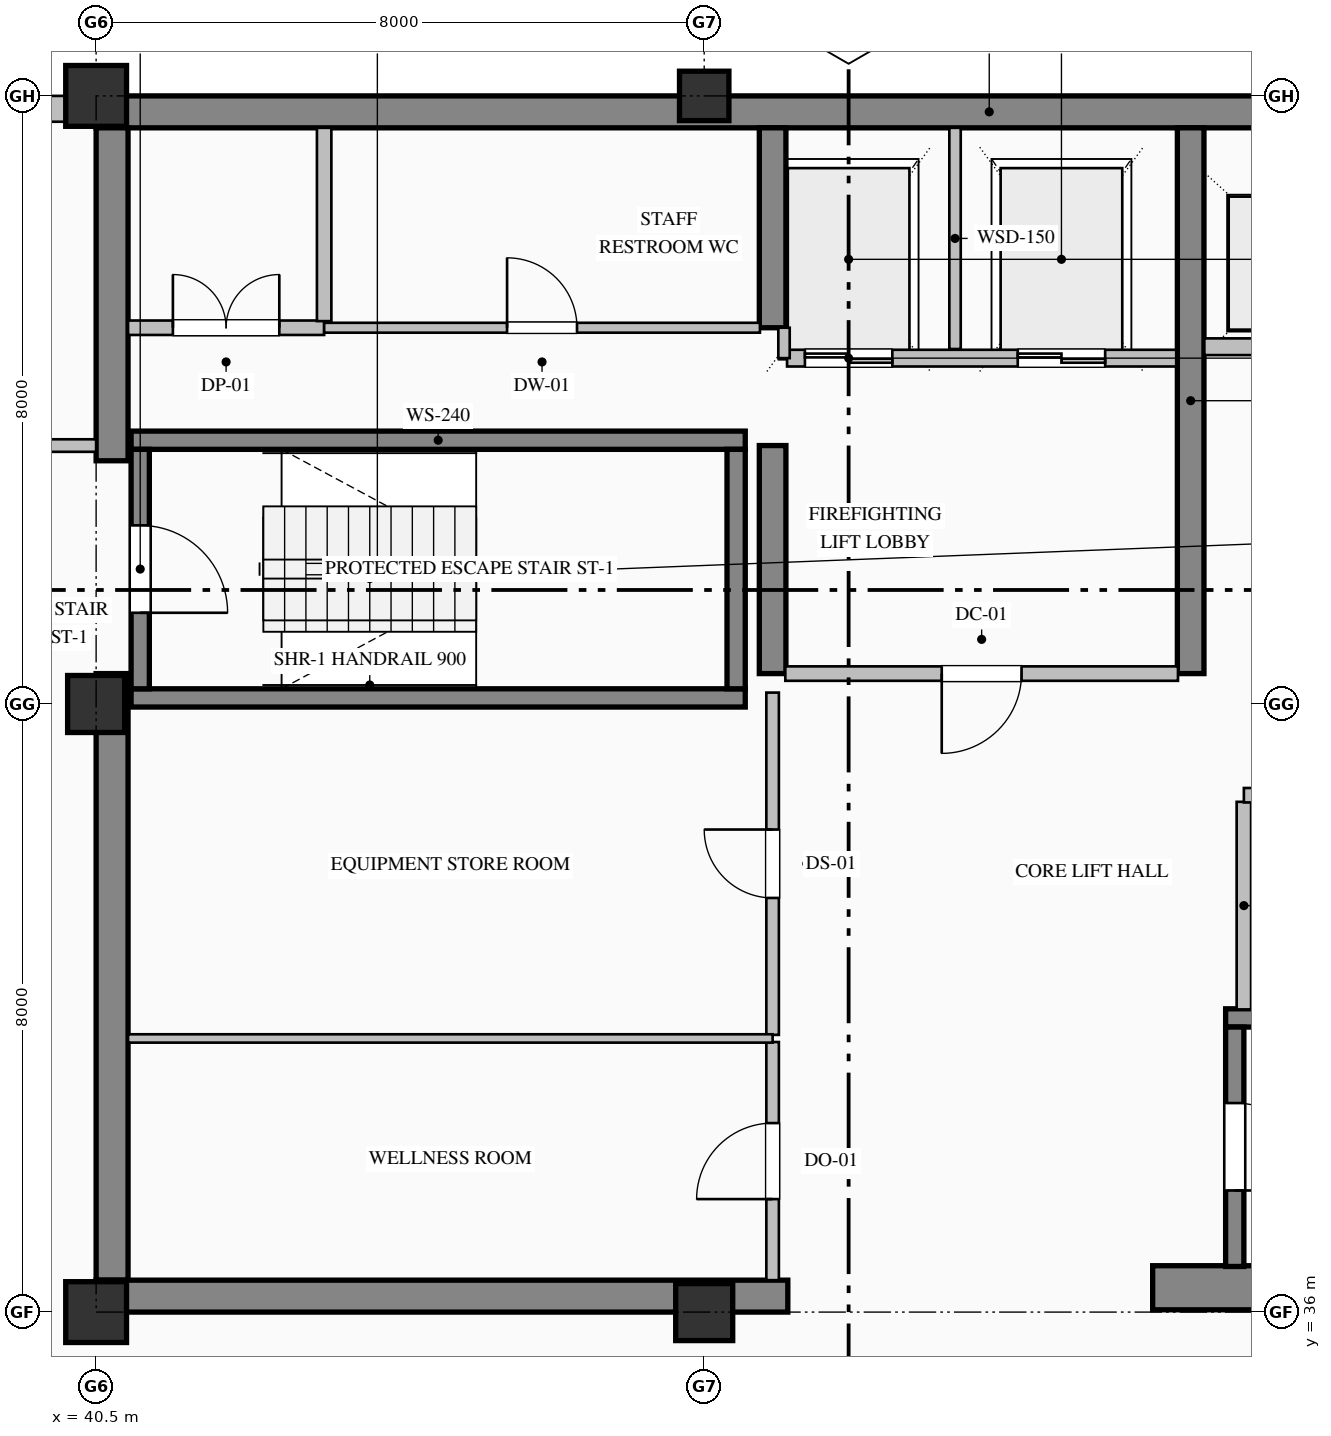
"""IFC4 building model, lengths in metres.
Left out: names, types, materials, properties, quantities, classifications, styles, units other than length and angle.
Written with IfcOpenShell. Run it as: python <this file> out.ifc"""

import sys

from ifc_helpers import new_model, si_unit, direction, frame, frame_2d, origin, origin_2d, place, context, subcontext, project, spatial, rectangle, hollow_rectangle, extrude, element, fill, save


model = new_model("IFC4")
c1 = context("Model", 3, precision=1e-05, world=origin(), true_north=direction((0.0, 1.0)))
c2 = subcontext(c1, "Body", "Model", "MODEL_VIEW")
j1 = project(units=[si_unit("LENGTHUNIT", "METRE"), si_unit("PLANEANGLEUNIT", "RADIAN")], contexts=[c1])
p1 = place(None, origin())
s1 = spatial("IfcSite", under=j1, at=p1, CompositionType="ELEMENT")
p2 = place(p1, origin())
s2 = spatial("IfcBuilding", under=s1, at=p2, CompositionType="ELEMENT")
p3 = place(p2, frame((0.0, 0.0, 343.2)))
s3 = spatial("IfcBuildingStorey", under=s2, at=p3, CompositionType="ELEMENT", Elevation=343.2)
p4 = place(p3, frame((40.5, 51.79, 0.0), z_axis=(0.0, 0.0, 1.0), x_axis=(1.0, 0.0, 0.0)))
e1 = element("IfcWall", 1, at=p4, inside=s3, PredefinedType="SHEAR", context=c2, shape_type="SweptSolid", body=[
    extrude(rectangle(XDim=23.5, YDim=0.42, at=frame_2d((11.75, 0.0))), origin(), (0.0, 0.0, 1.0), 3.785),
])
p5 = place(p3, frame((40.71, 36.42, 0.0), z_axis=(0.0, 0.0, 1.0), x_axis=(0.0, 1.0, 0.0)))
e2 = element("IfcWall", 2, at=p5, inside=s3, PredefinedType="SHEAR", context=c2, shape_type="SweptSolid", body=[
    extrude(rectangle(XDim=7.98, YDim=0.42, at=frame_2d((3.99, 0.0))), origin(), (0.0, 0.0, 1.0), 3.785),
])
p6 = place(p3, frame((40.71, 47.2, 0.0), z_axis=(0.0, 0.0, 1.0), x_axis=(0.0, 1.0, 0.0)))
e3 = element("IfcWall", 3, at=p6, inside=s3, PredefinedType="SHEAR", context=c2, shape_type="SweptSolid", body=[
    extrude(rectangle(XDim=4.38, YDim=0.42, at=frame_2d((2.19, 0.0))), origin(), (0.0, 0.0, 1.0), 3.785),
])
p7 = place(p3, frame((40.5, 36.21, 0.0), z_axis=(0.0, 0.0, 1.0), x_axis=(1.0, 0.0, 0.0)))
e4 = element("IfcWall", 4, at=p7, inside=s3, PredefinedType="SHEAR", context=c2, shape_type="SweptSolid", body=[
    extrude(rectangle(XDim=9.1, YDim=0.42, at=frame_2d((4.55, 0.0))), origin(), (0.0, 0.0, 1.0), 3.785),
])
p8 = place(p3, frame((54.4, 36.32, 0.0), z_axis=(0.0, 0.0, 1.0), x_axis=(1.0, 0.0, 0.0)))
e5 = element("IfcWall", 5, at=p8, inside=s3, PredefinedType="SHEAR", context=c2, shape_type="SweptSolid", body=[
    extrude(rectangle(XDim=9.6, YDim=0.58, at=frame_2d((4.8, 0.0))), origin(), (0.0, 0.0, 1.0), 4.0),
])
p9 = place(p3, frame((49.4, 44.4, 0.0), z_axis=(0.0, 0.0, 1.0), x_axis=(0.0, 1.0, 0.0)))
e6 = element("IfcWall", 6, at=p9, inside=s3, PredefinedType="SHEAR", context=c2, shape_type="SweptSolid", body=[
    extrude(rectangle(XDim=3.0, YDim=0.35, at=frame_2d((1.5, 0.0))), origin(), (0.0, 0.0, 1.0), 3.785),
])
p10 = place(p3, frame((49.4, 48.95, 0.0), z_axis=(0.0, 0.0, 1.0), x_axis=(0.0, 1.0, 0.0)))
e7 = element("IfcWall", 7, at=p10, inside=s3, PredefinedType="SHEAR", context=c2, shape_type="SweptSolid", body=[
    extrude(rectangle(XDim=2.63, YDim=0.35, at=frame_2d((1.315, 0.0))), origin(), (0.0, 0.0, 1.0), 3.785),
])
p11 = place(p3, frame((54.9, 44.4, 0.0), z_axis=(0.0, 0.0, 1.0), x_axis=(0.0, 1.0, 0.0)))
e8 = element("IfcWall", 8, at=p11, inside=s3, PredefinedType="SHEAR", context=c2, shape_type="SweptSolid", body=[
    extrude(rectangle(XDim=7.18, YDim=0.35, at=frame_2d((3.59, 0.0))), origin(), (0.0, 0.0, 1.0), 3.785),
])
p12 = place(p3, frame((40.5, 36.0, 0.0), z_axis=(0.0, 0.0, 1.0), x_axis=(1.0, 0.0, 0.0)))
e9 = element("IfcColumn", 9, at=p12, inside=s3, PredefinedType="COLUMN", context=c2, shape_type="SweptSolid", body=[
    extrude(hollow_rectangle(XDim=0.8, YDim=0.8, WallThickness=0.032, at=origin_2d()), origin(), (0.0, 0.0, 1.0), 4.0),
])
p13 = place(p3, frame((40.5, 44.0, 0.0), z_axis=(0.0, 0.0, 1.0), x_axis=(1.0, 0.0, 0.0)))
e10 = element("IfcColumn", 10, at=p13, inside=s3, PredefinedType="COLUMN", context=c2, shape_type="SweptSolid", body=[
    extrude(rectangle(XDim=0.75, YDim=0.75, at=origin_2d()), origin(), (0.0, 0.0, 1.0), 4.0),
])
p14 = place(p3, frame((40.5, 52.0, 0.0), z_axis=(0.0, 0.0, 1.0), x_axis=(1.0, 0.0, 0.0)))
e11 = element("IfcColumn", 11, at=p14, inside=s3, PredefinedType="COLUMN", context=c2, shape_type="SweptSolid", body=[
    extrude(hollow_rectangle(XDim=0.8, YDim=0.8, WallThickness=0.032, at=origin_2d()), origin(), (0.0, 0.0, 1.0), 4.0),
])
p15 = place(p3, frame((48.5, 36.0, 0.0), z_axis=(0.0, 0.0, 1.0), x_axis=(1.0, 0.0, 0.0)))
e12 = element("IfcColumn", 12, at=p15, inside=s3, PredefinedType="COLUMN", context=c2, shape_type="SweptSolid", body=[
    extrude(rectangle(XDim=0.75, YDim=0.75, at=origin_2d()), origin(), (0.0, 0.0, 1.0), 4.0),
])
p16 = place(p3, frame((48.5, 52.0, 0.0), z_axis=(0.0, 0.0, 1.0), x_axis=(1.0, 0.0, 0.0)))
e13 = element("IfcColumn", 13, at=p16, inside=s3, PredefinedType="COLUMN", context=c2, shape_type="SweptSolid", body=[
    extrude(hollow_rectangle(XDim=0.65, YDim=0.65, WallThickness=0.028, at=origin_2d()), origin(), (0.0, 0.0, 1.0), 4.0),
])
p17 = place(p3, frame((20.5, 51.83, 0.0), z_axis=(0.0, 0.0, 1.0), x_axis=(1.0, 0.0, 0.0)))
e14 = element("IfcWall", 14, at=p17, inside=s3, PredefinedType="SOLIDWALL", context=c2, shape_type="SweptSolid", body=[
    extrude(rectangle(XDim=20.02, YDim=0.34, at=frame_2d((10.01, 0.0))), origin(), (0.0, 0.0, 1.0), 3.335),
])
for number, where, z_axis, x_axis in (
    (15, (40.96, 47.47, 0.0), (0.0, 0.0, 1.0), (1.0, 0.0, 0.0)),
    (16, (49.04, 44.08, 0.0), (0.0, 0.0, 1.0), (-1.0, 0.0, 0.0)),
):
    element("IfcWall", number, at=place(p3, frame(where, z_axis=z_axis, x_axis=x_axis)), inside=s3, PredefinedType="SOLIDWALL", context=c2, shape_type="SweptSolid", body=[
        extrude(rectangle(XDim=8.08, YDim=0.24, at=frame_2d((4.04, 0.0))), origin(), (0.0, 0.0, 1.0), 4.0),
    ])
p18 = place(p3, frame((41.08, 47.35, 0.0), z_axis=(0.0, 0.0, 1.0), x_axis=(0.0, -1.0, 0.0)))
e17 = element("IfcWall", 17, at=p18, inside=s3, PredefinedType="SOLIDWALL", context=c2, shape_type="SweptSolid", body=[
    extrude(rectangle(XDim=3.15, YDim=0.24, at=frame_2d((1.575, 0.0))), origin(), (0.0, 0.0, 1.0), 4.0),
])
p19 = place(p18, frame((1.0, 0.0, 0.0)))
e18 = element("IfcOpeningElement", 18, at=p19, cuts=e17, PredefinedType="OPENING", context=c2, shape_type="SweptSolid", body=[
    extrude(rectangle(XDim=1.15, YDim=2.2, at=frame_2d((0.575, 1.1))), frame((0.0, 0.13, 0.0), z_axis=(0.0, -1.0, 0.0), x_axis=(1.0, 0.0, 0.0)), (0.0, 0.0, 1.0), 0.26),
])
p20 = place(p3, frame((48.92, 44.2, 0.0), z_axis=(0.0, 0.0, 1.0), x_axis=(0.0, 1.0, 0.0)))
e19 = element("IfcWall", 19, at=p20, inside=s3, PredefinedType="SOLIDWALL", context=c2, shape_type="SweptSolid", body=[
    extrude(rectangle(XDim=3.15, YDim=0.24, at=frame_2d((1.575, 0.0))), origin(), (0.0, 0.0, 1.0), 4.0),
])
p21 = place(p3, frame((55.36, 39.87, 0.0), z_axis=(0.0, 0.0, 1.0), x_axis=(1.0, 0.0, 0.0)))
e20 = element("IfcWall", 20, at=p21, inside=s3, PredefinedType="SOLIDWALL", context=c2, shape_type="SweptSolid", body=[
    extrude(rectangle(XDim=8.08, YDim=0.24, at=frame_2d((4.04, 0.0))), origin(), (0.0, 0.0, 1.0), 4.0),
])
p22 = place(p3, frame((55.48, 39.75, 0.0), z_axis=(0.0, 0.0, 1.0), x_axis=(0.0, -1.0, 0.0)))
e21 = element("IfcWall", 21, at=p22, inside=s3, PredefinedType="SOLIDWALL", context=c2, shape_type="SweptSolid", body=[
    extrude(rectangle(XDim=3.15, YDim=0.24, at=frame_2d((1.575, 0.0))), origin(), (0.0, 0.0, 1.0), 4.0),
])
p23 = place(p22, frame((1.0, 0.0, 0.0)))
e22 = element("IfcOpeningElement", 22, at=p23, cuts=e21, PredefinedType="OPENING", context=c2, shape_type="SweptSolid", body=[
    extrude(rectangle(XDim=1.15, YDim=2.2, at=frame_2d((0.575, 1.1))), frame((0.0, 0.13, 0.0), z_axis=(0.0, -1.0, 0.0), x_axis=(1.0, 0.0, 0.0)), (0.0, 0.0, 1.0), 0.26),
])
p24 = place(p3, frame((54.71, 48.55, 0.0), z_axis=(0.0, 0.0, 1.0), x_axis=(-1.0, 0.0, 0.0)))
e23 = element("IfcWall", 23, at=p24, inside=s3, PredefinedType="PARTITIONING", context=c2, shape_type="SweptSolid", body=[
    extrude(rectangle(XDim=5.12, YDim=0.22, at=frame_2d((2.56, 0.0))), origin(), (0.0, 0.0, 1.0), 3.785),
])
p25 = place(p24, frame((3.735, 0.0, 0.0)))
e24 = element("IfcOpeningElement", 24, at=p25, cuts=e23, PredefinedType="OPENING", context=c2, shape_type="SweptSolid", body=[
    extrude(rectangle(XDim=1.15, YDim=2.2, at=frame_2d((0.575, 1.1))), frame((0.0, 0.12, 0.0), z_axis=(0.0, -1.0, 0.0), x_axis=(1.0, 0.0, 0.0)), (0.0, 0.0, 1.0), 0.24),
])
p26 = place(p24, frame((0.935, 0.0, 0.0)))
e25 = element("IfcOpeningElement", 25, at=p26, cuts=e23, PredefinedType="OPENING", context=c2, shape_type="SweptSolid", body=[
    extrude(rectangle(XDim=1.15, YDim=2.2, at=frame_2d((0.575, 1.1))), frame((0.0, 0.12, 0.0), z_axis=(0.0, -1.0, 0.0), x_axis=(1.0, 0.0, 0.0)), (0.0, 0.0, 1.0), 0.24),
])
p27 = place(p3, frame((51.8, 48.67, 0.0), z_axis=(0.0, 0.0, 1.0), x_axis=(0.0, 1.0, 0.0)))
e26 = element("IfcWall", 26, at=p27, inside=s3, PredefinedType="PARTITIONING", context=c2, shape_type="SweptSolid", body=[
    extrude(rectangle(XDim=2.91, YDim=0.15, at=frame_2d((1.455, 0.0))), origin(), (0.0, 0.0, 1.0), 3.785),
])
p28 = place(p3, frame((49.55, 48.55, 0.0), z_axis=(0.0, 0.0, 1.0), x_axis=(0.0, 1.0, 0.0)))
e27 = element("IfcWall", 27, at=p28, inside=s3, PredefinedType="PARTITIONING", context=c2, shape_type="SweptSolid", body=[
    extrude(rectangle(XDim=0.4, YDim=0.15, at=frame_2d((0.2, 0.0))), origin(), (0.0, 0.0, 1.0), 3.785),
])
p29 = place(p3, frame((63.32, 48.7, 0.0), z_axis=(0.0, 0.0, 1.0), x_axis=(-1.0, 0.0, 0.0)))
e28 = element("IfcWall", 28, at=p29, inside=s3, PredefinedType="PARTITIONING", context=c2, shape_type="SweptSolid", body=[
    extrude(rectangle(XDim=8.24, YDim=0.22, at=frame_2d((4.12, 0.0))), origin(), (0.0, 0.0, 1.0), 3.785),
])
p30 = place(p29, frame((6.37, 0.0, 0.0)))
e29 = element("IfcOpeningElement", 29, at=p30, cuts=e28, PredefinedType="OPENING", context=c2, shape_type="SweptSolid", body=[
    extrude(rectangle(XDim=1.1, YDim=2.2, at=frame_2d((0.55, 1.1))), frame((0.0, 0.12, 0.0), z_axis=(0.0, -1.0, 0.0), x_axis=(1.0, 0.0, 0.0)), (0.0, 0.0, 1.0), 0.24),
])
p31 = place(p29, frame((3.57, 0.0, 0.0)))
e30 = element("IfcOpeningElement", 30, at=p31, cuts=e28, PredefinedType="OPENING", context=c2, shape_type="SweptSolid", body=[
    extrude(rectangle(XDim=1.1, YDim=2.2, at=frame_2d((0.55, 1.1))), frame((0.0, 0.12, 0.0), z_axis=(0.0, -1.0, 0.0), x_axis=(1.0, 0.0, 0.0)), (0.0, 0.0, 1.0), 0.24),
])
p32 = place(p29, frame((0.77, 0.0, 0.0)))
e31 = element("IfcOpeningElement", 31, at=p32, cuts=e28, PredefinedType="OPENING", context=c2, shape_type="SweptSolid", body=[
    extrude(rectangle(XDim=1.1, YDim=2.2, at=frame_2d((0.55, 1.1))), frame((0.0, 0.12, 0.0), z_axis=(0.0, -1.0, 0.0), x_axis=(1.0, 0.0, 0.0)), (0.0, 0.0, 1.0), 0.24),
])
p33 = place(p3, frame((37.8, 47.4, 0.0), z_axis=(0.0, 0.0, 1.0), x_axis=(1.0, 0.0, 0.0)))
e32 = element("IfcWall", 32, at=p33, inside=s3, PredefinedType="PARTITIONING", context=c2, shape_type="SweptSolid", body=[
    extrude(rectangle(XDim=2.7, YDim=0.165, at=frame_2d((1.35, 0.0))), origin(), (0.0, 0.0, 1.0), 3.785),
])
p34 = place(p33, frame((0.825, 0.0, 0.0)))
e33 = element("IfcOpeningElement", 33, at=p34, cuts=e32, PredefinedType="OPENING", context=c2, shape_type="SweptSolid", body=[
    extrude(rectangle(XDim=1.05, YDim=2.15, at=frame_2d((0.525, 1.075))), frame((0.0, 0.093, 0.0), z_axis=(0.0, -1.0, 0.0), x_axis=(1.0, 0.0, 0.0)), (0.0, 0.0, 1.0), 0.185),
])
p35 = place(p3, frame((40.92, 48.95, 0.0), z_axis=(0.0, 0.0, 1.0), x_axis=(1.0, 0.0, 0.0)))
e34 = element("IfcWall", 34, at=p35, inside=s3, PredefinedType="PARTITIONING", context=c2, shape_type="SweptSolid", body=[
    extrude(rectangle(XDim=2.58, YDim=0.19, at=frame_2d((1.29, 0.0))), origin(), (0.0, 0.0, 1.0), 3.785),
])
p36 = place(p35, frame((0.59, 0.0, 0.0)))
e35 = element("IfcOpeningElement", 35, at=p36, cuts=e34, PredefinedType="OPENING", context=c2, shape_type="SweptSolid", body=[
    extrude(rectangle(XDim=1.4, YDim=2.25, at=frame_2d((0.7, 1.125))), frame((0.0, 0.105, 0.0), z_axis=(0.0, -1.0, 0.0), x_axis=(1.0, 0.0, 0.0)), (0.0, 0.0, 1.0), 0.21),
])
p37 = place(p3, frame((43.5, 48.95, 0.0), z_axis=(0.0, 0.0, 1.0), x_axis=(1.0, 0.0, 0.0)))
e36 = element("IfcWall", 36, at=p37, inside=s3, PredefinedType="PARTITIONING", context=c2, shape_type="SweptSolid", body=[
    extrude(rectangle(XDim=5.733, YDim=0.13, at=frame_2d((2.866, 0.0))), origin(), (0.0, 0.0, 1.0), 3.785),
])
p38 = place(p37, frame((2.406, 0.0, 0.0)))
e37 = element("IfcOpeningElement", 37, at=p38, cuts=e36, PredefinedType="OPENING", context=c2, shape_type="SweptSolid", body=[
    extrude(rectangle(XDim=0.92, YDim=2.15, at=frame_2d((0.46, 1.075))), frame((0.0, 0.075, 0.0), z_axis=(0.0, -1.0, 0.0), x_axis=(1.0, 0.0, 0.0)), (0.0, 0.0, 1.0), 0.15),
])
p39 = place(p3, frame((54.733, 44.4, 0.0), z_axis=(0.0, 0.0, 1.0), x_axis=(-1.0, 0.0, 0.0)))
e38 = element("IfcWall", 38, at=p39, inside=s3, PredefinedType="PARTITIONING", context=c2, shape_type="SweptSolid", body=[
    extrude(rectangle(XDim=5.166, YDim=0.19, at=frame_2d((2.583, 0.0))), origin(), (0.0, 0.0, 1.0), 3.785),
])
p40 = place(p39, frame((2.058, 0.0, 0.0)))
e39 = element("IfcOpeningElement", 39, at=p40, cuts=e38, PredefinedType="OPENING", context=c2, shape_type="SweptSolid", body=[
    extrude(rectangle(XDim=1.05, YDim=2.15, at=frame_2d((0.525, 1.075))), frame((0.0, 0.105, 0.0), z_axis=(0.0, -1.0, 0.0), x_axis=(1.0, 0.0, 0.0)), (0.0, 0.0, 1.0), 0.21),
])
p41 = place(p3, frame((49.4, 36.42, 0.0), z_axis=(0.0, 0.0, 1.0), x_axis=(0.0, 1.0, 0.0)))
e40 = element("IfcWall", 40, at=p41, inside=s3, PredefinedType="PARTITIONING", context=c2, shape_type="SweptSolid", body=[
    extrude(rectangle(XDim=3.133, YDim=0.165, at=frame_2d((1.566, 0.0))), origin(), (0.0, 0.0, 1.0), 3.027),
])
p42 = place(p41, frame((1.066, 0.0, 0.0)))
e41 = element("IfcOpeningElement", 41, at=p42, cuts=e40, PredefinedType="OPENING", context=c2, shape_type="SweptSolid", body=[
    extrude(rectangle(XDim=1.0, YDim=2.15, at=frame_2d((0.5, 1.075))), frame((0.0, 0.093, 0.0), z_axis=(0.0, -1.0, 0.0), x_axis=(1.0, 0.0, 0.0)), (0.0, 0.0, 1.0), 0.185),
])
p43 = place(p3, frame((49.4, 39.647, 0.0), z_axis=(0.0, 0.0, 1.0), x_axis=(0.0, 1.0, 0.0)))
e42 = element("IfcWall", 42, at=p43, inside=s3, PredefinedType="PARTITIONING", context=c2, shape_type="SweptSolid", body=[
    extrude(rectangle(XDim=4.503, YDim=0.165, at=frame_2d((2.251, 0.0))), origin(), (0.0, 0.0, 1.0), 3.027),
])
p44 = place(p43, frame((1.802, 0.0, 0.0)))
e43 = element("IfcOpeningElement", 43, at=p44, cuts=e42, PredefinedType="OPENING", context=c2, shape_type="SweptSolid", body=[
    extrude(rectangle(XDim=0.9, YDim=2.15, at=frame_2d((0.45, 1.075))), frame((0.0, 0.093, 0.0), z_axis=(0.0, -1.0, 0.0), x_axis=(1.0, 0.0, 0.0)), (0.0, 0.0, 1.0), 0.185),
])
p45 = place(p3, frame((55.6, 42.713, 0.0), z_axis=(0.0, 0.0, 1.0), x_axis=(0.0, -1.0, 0.0)))
e44 = element("IfcWall", 44, at=p45, inside=s3, PredefinedType="PARTITIONING", context=c2, shape_type="SweptSolid", body=[
    extrude(rectangle(XDim=2.731, YDim=0.19, at=frame_2d((1.365, 0.0))), origin(), (0.0, 0.0, 1.0), 3.785),
])
p46 = place(p3, frame((40.92, 39.6, 0.0), z_axis=(0.0, 0.0, 1.0), x_axis=(1.0, 0.0, 0.0)))
e45 = element("IfcWall", 45, at=p46, inside=s3, PredefinedType="MOVABLE", context=c2, shape_type="SweptSolid", body=[
    extrude(rectangle(XDim=8.48, YDim=0.11, at=frame_2d((4.24, 0.0))), origin(), (0.0, 0.0, 1.0), 3.785),
])
p47 = place(p3, frame((60.6, 42.8, 0.0), z_axis=(0.0, 0.0, 1.0), x_axis=(-1.0, 0.0, 0.0)))
e46 = element("IfcWall", 46, at=p47, inside=s3, PredefinedType="PARTITIONING", context=c2, shape_type="SweptSolid", body=[
    extrude(rectangle(XDim=5.0, YDim=0.19, at=frame_2d((2.5, 0.0))), origin(), (0.0, 0.0, 1.0), 3.785),
])
p48 = place(p47, frame((1.8, 0.0, 0.0)))
e47 = element("IfcOpeningElement", 47, at=p48, cuts=e46, PredefinedType="OPENING", context=c2, shape_type="SweptSolid", body=[
    extrude(rectangle(XDim=1.4, YDim=2.25, at=frame_2d((0.7, 1.125))), frame((0.0, 0.105, 0.0), z_axis=(0.0, -1.0, 0.0), x_axis=(1.0, 0.0, 0.0)), (0.0, 0.0, 1.0), 0.21),
])
p49 = place(p3, frame((43.5, 51.58, 0.0), z_axis=(0.0, 0.0, 1.0), x_axis=(0.0, -1.0, 0.0)))
e48 = element("IfcWall", 48, at=p49, inside=s3, PredefinedType="PARTITIONING", context=c2, shape_type="SweptSolid", body=[
    extrude(rectangle(XDim=2.543, YDim=0.19, at=frame_2d((1.271, 0.0))), origin(), (0.0, 0.0, 1.0), 3.785),
])
p50 = place(p19, origin())
e49 = element("IfcDoor", 49, at=p50, inside=s3, OperationType="SINGLE_SWING_RIGHT", PredefinedType="DOOR", context=c2, shape_type="SweptSolid", body=[
    extrude(rectangle(XDim=1.15, YDim=2.2, at=frame_2d((0.575, 1.1))), frame((0.0, 0.025, 0.0), z_axis=(0.0, -1.0, 0.0), x_axis=(1.0, 0.0, 0.0)), (0.0, 0.0, 1.0), 0.05),
])
fill(e18, e49)
p51 = place(p23, origin())
e50 = element("IfcDoor", 50, at=p51, inside=s3, OperationType="SINGLE_SWING_RIGHT", PredefinedType="DOOR", context=c2, shape_type="SweptSolid", body=[
    extrude(rectangle(XDim=1.15, YDim=2.2, at=frame_2d((0.575, 1.1))), frame((0.0, 0.025, 0.0), z_axis=(0.0, -1.0, 0.0), x_axis=(1.0, 0.0, 0.0)), (0.0, 0.0, 1.0), 0.05),
])
fill(e22, e50)
p52 = place(p25, origin())
e51 = element("IfcDoor", 51, at=p52, inside=s3, OperationType="DOUBLE_DOOR_SLIDING", PredefinedType="DOOR", context=c2, shape_type="SweptSolid", body=[
    extrude(rectangle(XDim=1.15, YDim=2.2, at=frame_2d((0.575, 1.1))), frame((0.0, 0.025, 0.0), z_axis=(0.0, -1.0, 0.0), x_axis=(1.0, 0.0, 0.0)), (0.0, 0.0, 1.0), 0.05),
])
fill(e24, e51)
p53 = place(p26, origin())
e52 = element("IfcDoor", 52, at=p53, inside=s3, OperationType="DOUBLE_DOOR_SLIDING", PredefinedType="DOOR", context=c2, shape_type="SweptSolid", body=[
    extrude(rectangle(XDim=1.15, YDim=2.2, at=frame_2d((0.575, 1.1))), frame((0.0, 0.025, 0.0), z_axis=(0.0, -1.0, 0.0), x_axis=(1.0, 0.0, 0.0)), (0.0, 0.0, 1.0), 0.05),
])
fill(e25, e52)
p54 = place(p40, origin())
e53 = element("IfcDoor", 53, at=p54, inside=s3, OperationType="SINGLE_SWING_RIGHT", PredefinedType="DOOR", context=c2, shape_type="SweptSolid", body=[
    extrude(rectangle(XDim=1.05, YDim=2.15, at=frame_2d((0.525, 1.075))), frame((0.0, 0.025, 0.0), z_axis=(0.0, -1.0, 0.0), x_axis=(1.0, 0.0, 0.0)), (0.0, 0.0, 1.0), 0.05),
])
fill(e39, e53)
p55 = place(p42, origin())
e54 = element("IfcDoor", 54, at=p55, inside=s3, OperationType="SINGLE_SWING_LEFT", PredefinedType="DOOR", context=c2, shape_type="SweptSolid", body=[
    extrude(rectangle(XDim=1.0, YDim=2.15, at=frame_2d((0.5, 1.075))), frame((0.0, 0.025, 0.0), z_axis=(0.0, -1.0, 0.0), x_axis=(1.0, 0.0, 0.0)), (0.0, 0.0, 1.0), 0.05),
])
fill(e41, e54)
p56 = place(p44, origin())
e55 = element("IfcDoor", 55, at=p56, inside=s3, OperationType="SINGLE_SWING_RIGHT", PredefinedType="DOOR", context=c2, shape_type="SweptSolid", body=[
    extrude(rectangle(XDim=0.9, YDim=2.15, at=frame_2d((0.45, 1.075))), frame((0.0, 0.025, 0.0), z_axis=(0.0, -1.0, 0.0), x_axis=(1.0, 0.0, 0.0)), (0.0, 0.0, 1.0), 0.05),
])
fill(e43, e55)
p57 = place(p36, origin())
e56 = element("IfcDoor", 56, at=p57, inside=s3, OperationType="DOUBLE_DOOR_SINGLE_SWING", PredefinedType="DOOR", context=c2, shape_type="SweptSolid", body=[
    extrude(rectangle(XDim=1.4, YDim=2.25, at=frame_2d((0.7, 1.125))), frame((0.0, 0.025, 0.0), z_axis=(0.0, -1.0, 0.0), x_axis=(1.0, 0.0, 0.0)), (0.0, 0.0, 1.0), 0.05),
])
fill(e35, e56)
p58 = place(p38, origin())
e57 = element("IfcDoor", 57, at=p58, inside=s3, OperationType="SINGLE_SWING_LEFT", PredefinedType="DOOR", context=c2, shape_type="SweptSolid", body=[
    extrude(rectangle(XDim=0.92, YDim=2.15, at=frame_2d((0.46, 1.075))), frame((0.0, 0.025, 0.0), z_axis=(0.0, -1.0, 0.0), x_axis=(1.0, 0.0, 0.0)), (0.0, 0.0, 1.0), 0.05),
])
fill(e37, e57)
save(model, sys.argv[1])
